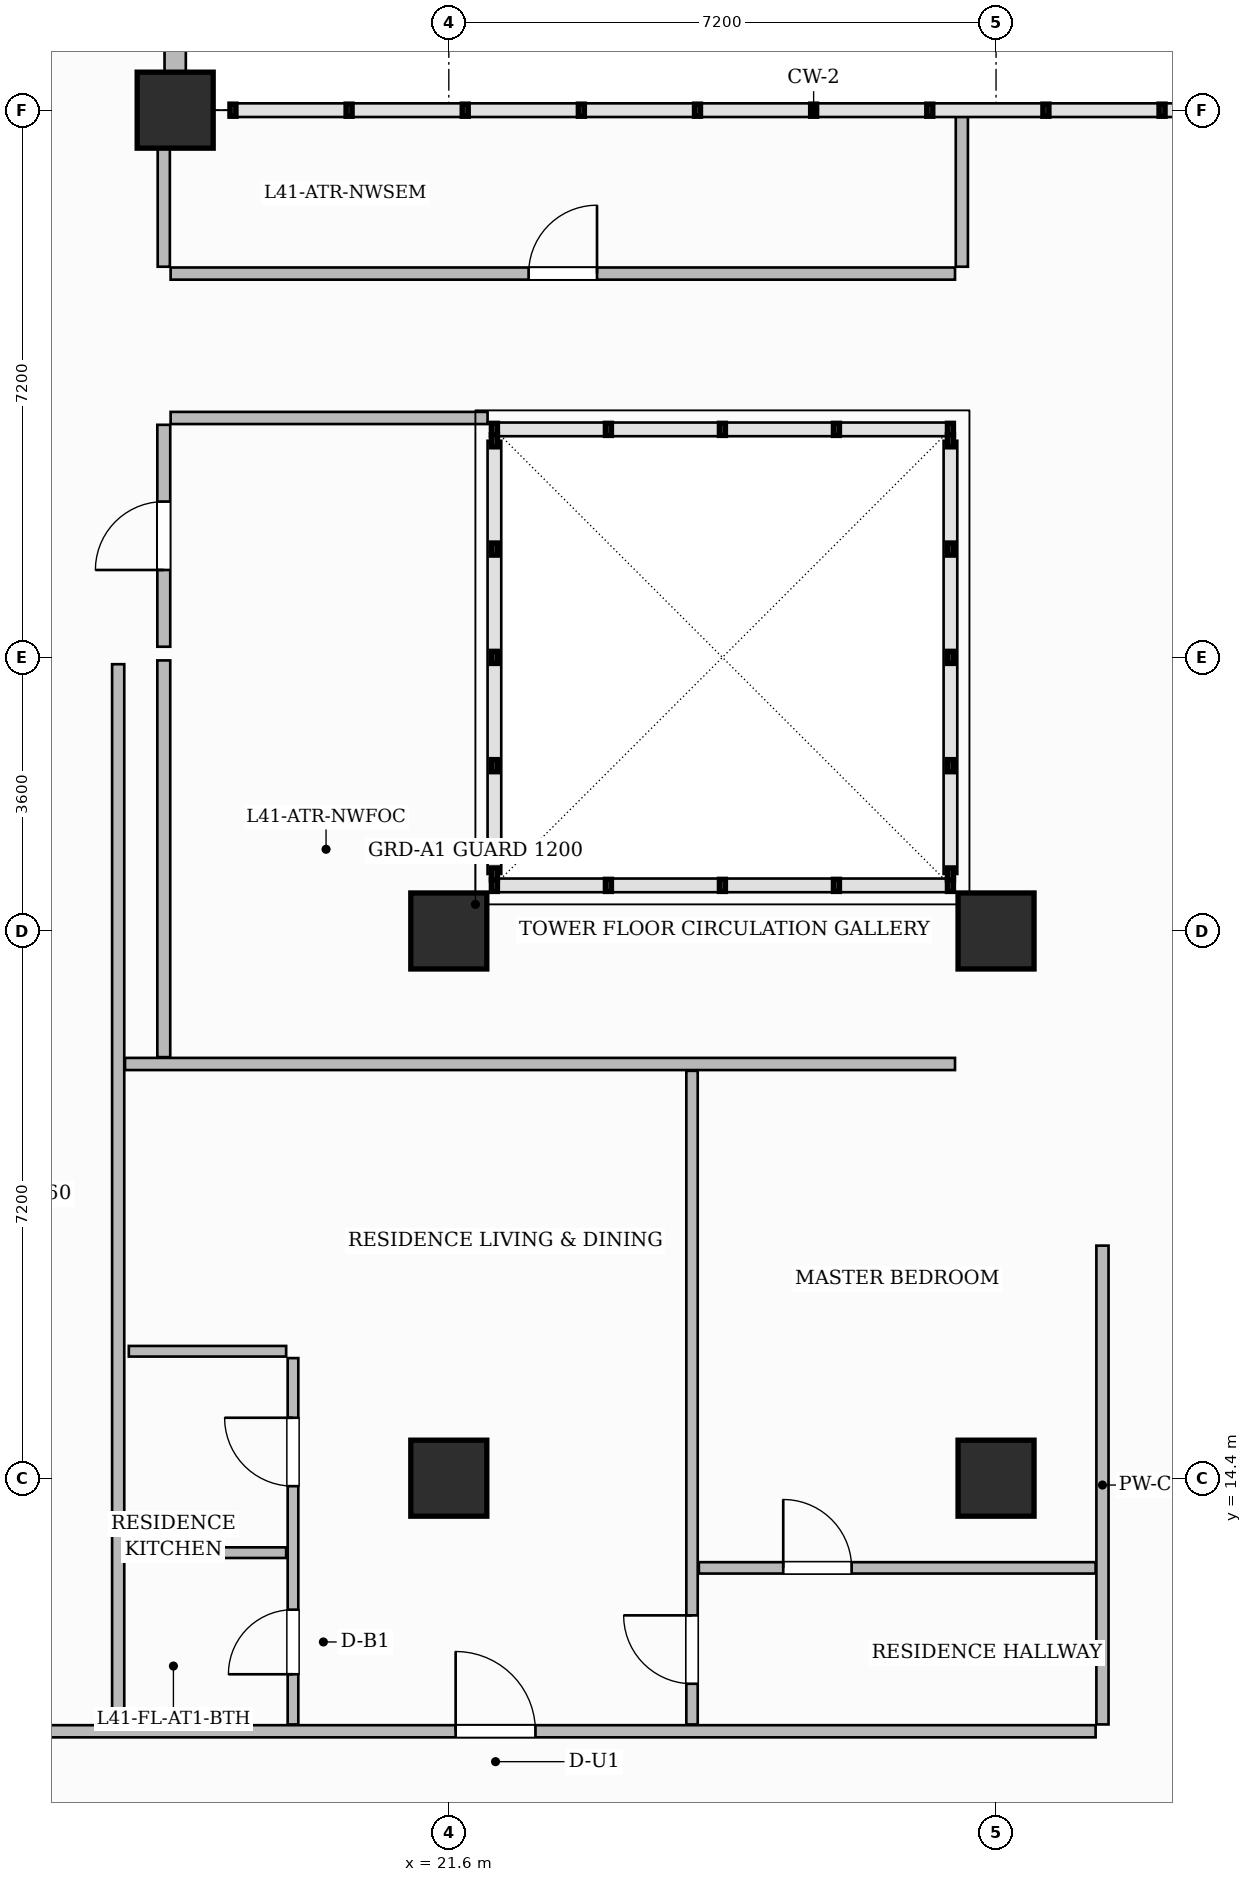
"""IFC4 building model, lengths in metres.
Left out: names, types, materials, properties, quantities, classifications, styles, units other than length and angle.
Written with IfcOpenShell. Run it as: python <this file> out.ifc"""

import sys

from ifc_helpers import new_model, si_unit, direction, frame, frame_2d, origin, origin_2d, place, context, subcontext, project, spatial, rectangle, extrude, source, transform, mapped, element, fill, save


model = new_model("IFC4")
c1 = context("Model", 3, precision=1e-05, world=origin(), true_north=direction((0.0, 1.0)))
c2 = subcontext(c1, "Body", "Model", "MODEL_VIEW")
j1 = project(units=[si_unit("LENGTHUNIT", "METRE"), si_unit("PLANEANGLEUNIT", "RADIAN")], contexts=[c1])
p1 = place(None, origin())
s1 = spatial("IfcSite", under=j1, at=p1, CompositionType="ELEMENT")
p2 = place(p1, origin())
s2 = spatial("IfcBuilding", under=s1, at=p2, CompositionType="ELEMENT")
p3 = place(p2, frame((0.0, 0.0, 165.7)))
s3 = spatial("IfcBuildingStorey", under=s2, at=p3, CompositionType="ELEMENT", Elevation=165.7)
m1 = source(origin(), c2, "Body", "SweptSolid", [
    extrude(rectangle(XDim=1.0, YDim=1.0, at=origin_2d()), origin(), (0.0, 0.0, 1.0), 3.85),
])
for number, where, z_axis, x_axis in (
    (1, (21.6, 14.4, 0.0), (0.0, 0.0, 1.0), (1.0, 0.0, 0.0)),
    (2, (21.6, 21.6, 0.0), (0.0, 0.0, 1.0), (1.0, 0.0, 0.0)),
    (3, (28.8, 14.4, 0.0), (0.0, 0.0, 1.0), (1.0, 0.0, 0.0)),
    (4, (28.8, 21.6, 0.0), (0.0, 0.0, 1.0), (1.0, 0.0, 0.0)),
    (5, (18.0, 32.4, 0.0), (0.0, 0.0, 1.0), (1.0, 0.0, 0.0)),
):
    element("IfcColumn", number, at=place(p3, frame(where, z_axis=z_axis, x_axis=x_axis)), inside=s3, PredefinedType="COLUMN", context=c2, shape_type="MappedRepresentation", body=[
        mapped(m1, transform((0.0, 0.0, 0.0), scale=1.0)),
    ])
p4 = place(p3, frame((14.548, 11.07, 0.0), z_axis=(0.0, 0.0, 1.0), x_axis=(1.0, 0.0, 0.0)))
e6 = element("IfcWall", 6, at=p4, inside=s3, PredefinedType="PARTITIONING", context=c2, shape_type="SweptSolid", body=[
    extrude(rectangle(XDim=15.562, YDim=0.16, at=frame_2d((7.781, 0.0))), origin(), (0.0, 0.0, 1.0), 3.6),
])
p5 = place(p4, frame((7.142, 0.0, 0.0)))
e7 = element("IfcOpeningElement", 7, at=p5, cuts=e6, PredefinedType="OPENING", context=c2, shape_type="SweptSolid", body=[
    extrude(rectangle(XDim=1.05, YDim=2.25, at=frame_2d((0.525, 1.125))), frame((0.0, 0.09, 0.0), z_axis=(0.0, -1.0, 0.0), x_axis=(1.0, 0.0, 0.0)), (0.0, 0.0, 1.0), 0.18),
])
p6 = place(p3, frame((30.2, 11.16, 0.0), z_axis=(0.0, 0.0, 1.0), x_axis=(0.0, 1.0, 0.0)))
e8 = element("IfcWall", 8, at=p6, inside=s3, PredefinedType="PARTITIONING", context=c2, shape_type="SweptSolid", body=[
    extrude(rectangle(XDim=6.3, YDim=0.16, at=frame_2d((3.15, 0.0))), origin(), (0.0, 0.0, 1.0), 3.6),
])
p7 = place(p3, frame((17.25, 11.16, 0.0), z_axis=(0.0, 0.0, 1.0), x_axis=(0.0, 1.0, 0.0)))
e9 = element("IfcWall", 9, at=p7, inside=s3, PredefinedType="PARTITIONING", context=c2, shape_type="SweptSolid", body=[
    extrude(rectangle(XDim=13.95, YDim=0.16, at=frame_2d((6.975, 0.0))), origin(), (0.0, 0.0, 1.0), 3.6),
])
p8 = place(p3, frame((17.85, 19.94, 0.0), z_axis=(0.0, 0.0, 1.0), x_axis=(0.0, 1.0, 0.0)))
e10 = element("IfcWall", 10, at=p8, inside=s3, PredefinedType="PARTITIONING", context=c2, shape_type="SweptSolid", body=[
    extrude(rectangle(XDim=5.22, YDim=0.17, at=frame_2d((2.61, 0.0))), origin(), (0.0, 0.0, 1.0), 3.285),
])
p9 = place(p3, frame((17.85, 30.34, 0.0), z_axis=(0.0, 0.0, 1.0), x_axis=(0.0, 1.0, 0.0)))
e11 = element("IfcWall", 11, at=p9, inside=s3, PredefinedType="PARTITIONING", context=c2, shape_type="SweptSolid", body=[
    extrude(rectangle(XDim=1.87, YDim=0.16, at=frame_2d((0.935, 0.0))), origin(), (0.0, 0.0, 1.0), 3.6),
])
p10 = place(p3, frame((28.35, 30.34, 0.0), z_axis=(0.0, 0.0, 1.0), x_axis=(0.0, 1.0, 0.0)))
e12 = element("IfcWall", 12, at=p10, inside=s3, PredefinedType="PARTITIONING", context=c2, shape_type="SweptSolid", body=[
    extrude(rectangle(XDim=2.032, YDim=0.16, at=frame_2d((1.016, 0.0))), origin(), (0.0, 0.0, 1.0), 3.6),
])
p11 = place(p3, frame((17.94, 28.35, 0.0), z_axis=(0.0, 0.0, 1.0), x_axis=(1.0, 0.0, 0.0)))
e13 = element("IfcWall", 13, at=p11, inside=s3, PredefinedType="PARTITIONING", context=c2, shape_type="SweptSolid", body=[
    extrude(rectangle(XDim=4.17, YDim=0.16, at=frame_2d((2.085, 0.0))), origin(), (0.0, 0.0, 1.0), 3.6),
])
p12 = place(p3, frame((17.94, 30.25, 0.0), z_axis=(0.0, 0.0, 1.0), x_axis=(1.0, 0.0, 0.0)))
e14 = element("IfcWall", 14, at=p12, inside=s3, PredefinedType="PARTITIONING", context=c2, shape_type="SweptSolid", body=[
    extrude(rectangle(XDim=10.32, YDim=0.16, at=frame_2d((5.16, 0.0))), origin(), (0.0, 0.0, 1.0), 3.6),
])
p13 = place(p12, frame((4.71, 0.0, 0.0)))
e15 = element("IfcOpeningElement", 15, at=p13, cuts=e14, PredefinedType="OPENING", context=c2, shape_type="SweptSolid", body=[
    extrude(rectangle(XDim=0.9, YDim=2.15, at=frame_2d((0.45, 1.075))), frame((0.0, 0.09, 0.0), z_axis=(0.0, -1.0, 0.0), x_axis=(1.0, 0.0, 0.0)), (0.0, 0.0, 1.0), 0.18),
])
p14 = place(p3, frame((17.85, 25.34, 0.0), z_axis=(0.0, 0.0, 1.0), x_axis=(0.0, 1.0, 0.0)))
e16 = element("IfcWall", 16, at=p14, inside=s3, PredefinedType="PARTITIONING", context=c2, shape_type="SweptSolid", body=[
    extrude(rectangle(XDim=2.92, YDim=0.17, at=frame_2d((1.46, 0.0))), origin(), (0.0, 0.0, 1.0), 3.6),
])
p15 = place(p14, frame((1.01, 0.0, 0.0)))
e17 = element("IfcOpeningElement", 17, at=p15, cuts=e16, PredefinedType="OPENING", context=c2, shape_type="SweptSolid", body=[
    extrude(rectangle(XDim=0.9, YDim=2.15, at=frame_2d((0.45, 1.075))), frame((0.0, 0.095, 0.0), z_axis=(0.0, -1.0, 0.0), x_axis=(1.0, 0.0, 0.0)), (0.0, 0.0, 1.0), 0.19),
])
p16 = place(p3, frame((17.34, 19.85, 0.0), z_axis=(0.0, 0.0, 1.0), x_axis=(1.0, 0.0, 0.0)))
e18 = element("IfcWall", 18, at=p16, inside=s3, PredefinedType="PARTITIONING", context=c2, shape_type="SweptSolid", body=[
    extrude(rectangle(XDim=10.92, YDim=0.16, at=frame_2d((5.46, 0.0))), origin(), (0.0, 0.0, 1.0), 3.6),
])
p17 = place(p3, frame((19.55, 11.16, 0.0), z_axis=(0.0, 0.0, 1.0), x_axis=(0.0, 1.0, 0.0)))
e19 = element("IfcWall", 19, at=p17, inside=s3, PredefinedType="PARTITIONING", context=c2, shape_type="SweptSolid", body=[
    extrude(rectangle(XDim=4.82, YDim=0.14, at=frame_2d((2.41, 0.0))), origin(), (0.0, 0.0, 1.0), 3.6),
])
p18 = place(p17, frame((0.66, 0.0, 0.0)))
e20 = element("IfcOpeningElement", 20, at=p18, cuts=e19, PredefinedType="OPENING", context=c2, shape_type="SweptSolid", body=[
    extrude(rectangle(XDim=0.85, YDim=2.1, at=frame_2d((0.425, 1.05))), frame((0.0, 0.08, 0.0), z_axis=(0.0, -1.0, 0.0), x_axis=(1.0, 0.0, 0.0)), (0.0, 0.0, 1.0), 0.16),
])
p19 = place(p17, frame((3.135, 0.0, 0.0)))
e21 = element("IfcOpeningElement", 21, at=p19, cuts=e19, PredefinedType="OPENING", context=c2, shape_type="SweptSolid", body=[
    extrude(rectangle(XDim=0.9, YDim=2.15, at=frame_2d((0.45, 1.075))), frame((0.0, 0.08, 0.0), z_axis=(0.0, -1.0, 0.0), x_axis=(1.0, 0.0, 0.0)), (0.0, 0.0, 1.0), 0.16),
])
for number, where, z_axis, x_axis in (
    (22, (17.39, 13.42, 0.0), (0.0, 0.0, 1.0), (1.0, 0.0, 0.0)),
    (23, (17.39, 16.07, 0.0), (0.0, 0.0, 1.0), (1.0, 0.0, 0.0)),
):
    element("IfcWall", number, at=place(p3, frame(where, z_axis=z_axis, x_axis=x_axis)), inside=s3, PredefinedType="PARTITIONING", context=c2, shape_type="SweptSolid", body=[
        extrude(rectangle(XDim=2.07, YDim=0.14, at=frame_2d((1.035, 0.0))), origin(), (0.0, 0.0, 1.0), 3.6),
    ])
p20 = place(p3, frame((24.8, 11.16, 0.0), z_axis=(0.0, 0.0, 1.0), x_axis=(0.0, 1.0, 0.0)))
e24 = element("IfcWall", 24, at=p20, inside=s3, PredefinedType="PARTITIONING", context=c2, shape_type="SweptSolid", body=[
    extrude(rectangle(XDim=8.6, YDim=0.15, at=frame_2d((4.3, 0.0))), origin(), (0.0, 0.0, 1.0), 3.6),
])
p21 = place(p20, frame((0.535, 0.0, 0.0)))
e25 = element("IfcOpeningElement", 25, at=p21, cuts=e24, PredefinedType="OPENING", context=c2, shape_type="SweptSolid", body=[
    extrude(rectangle(XDim=0.9, YDim=2.15, at=frame_2d((0.45, 1.075))), frame((0.0, 0.085, 0.0), z_axis=(0.0, -1.0, 0.0), x_axis=(1.0, 0.0, 0.0)), (0.0, 0.0, 1.0), 0.17),
])
p22 = place(p3, frame((24.89, 13.22, 0.0), z_axis=(0.0, 0.0, 1.0), x_axis=(1.0, 0.0, 0.0)))
e26 = element("IfcWall", 26, at=p22, inside=s3, PredefinedType="PARTITIONING", context=c2, shape_type="SweptSolid", body=[
    extrude(rectangle(XDim=5.22, YDim=0.15, at=frame_2d((2.61, 0.0))), origin(), (0.0, 0.0, 1.0), 3.6),
])
p23 = place(p22, frame((1.11, 0.0, 0.0)))
e27 = element("IfcOpeningElement", 27, at=p23, cuts=e26, PredefinedType="OPENING", context=c2, shape_type="SweptSolid", body=[
    extrude(rectangle(XDim=0.9, YDim=2.15, at=frame_2d((0.45, 1.075))), frame((0.0, 0.085, 0.0), z_axis=(0.0, -1.0, 0.0), x_axis=(1.0, 0.0, 0.0)), (0.0, 0.0, 1.0), 0.17),
])
p24 = place(p3, frame((18.0, 32.4, 0.0), z_axis=(0.0, 0.0, 1.0), x_axis=(0.0, 1.0, 0.0)))
e28 = element("IfcWall", 28, at=p24, inside=s3, PredefinedType="SOLIDWALL", context=c2, shape_type="SweptSolid", body=[
    extrude(rectangle(XDim=14.35, YDim=0.28, at=frame_2d((7.175, 0.0))), origin(), (0.0, 0.0, 1.0), 3.6),
])
p25 = place(p24, frame((1.5, 0.0, 0.0)))
e29 = element("IfcOpeningElement", 29, at=p25, cuts=e28, PredefinedType="OPENING", context=c2, shape_type="SweptSolid", body=[
    extrude(rectangle(XDim=1.2, YDim=2.2, at=frame_2d((0.6, 1.1))), frame((0.0, 0.15, 0.0), z_axis=(0.0, -1.0, 0.0), x_axis=(1.0, 0.0, 0.0)), (0.0, 0.0, 1.0), 0.3),
])
p26 = place(p24, frame((3.8, 0.0, 0.8)))
e30 = element("IfcOpeningElement", 30, at=p26, cuts=e28, PredefinedType="OPENING", context=c2, shape_type="SweptSolid", body=[
    extrude(rectangle(XDim=1.8, YDim=1.85, at=frame_2d((0.9, 0.925))), frame((0.0, 0.15, 0.0), z_axis=(0.0, -1.0, 0.0), x_axis=(1.0, 0.0, 0.0)), (0.0, 0.0, 1.0), 0.3),
])
p27 = place(p24, frame((8.525, 0.0, 0.8)))
e31 = element("IfcOpeningElement", 31, at=p27, cuts=e28, PredefinedType="OPENING", context=c2, shape_type="SweptSolid", body=[
    extrude(rectangle(XDim=1.8, YDim=1.85, at=frame_2d((0.9, 0.925))), frame((0.0, 0.15, 0.0), z_axis=(0.0, -1.0, 0.0), x_axis=(1.0, 0.0, 0.0)), (0.0, 0.0, 1.0), 0.3),
])
p28 = place(p24, frame((11.275, 0.0, 0.8)))
e32 = element("IfcOpeningElement", 32, at=p28, cuts=e28, PredefinedType="OPENING", context=c2, shape_type="SweptSolid", body=[
    extrude(rectangle(XDim=1.8, YDim=1.85, at=frame_2d((0.9, 0.925))), frame((0.0, 0.15, 0.0), z_axis=(0.0, -1.0, 0.0), x_axis=(1.0, 0.0, 0.0)), (0.0, 0.0, 1.0), 0.3),
])
m2 = source(origin(), c2, "Body", "SweptSolid", [
    extrude(rectangle(XDim=0.9, YDim=2.15, at=frame_2d((0.45, 1.075))), frame((0.0, 0.025, 0.0), z_axis=(0.0, -1.0, 0.0), x_axis=(1.0, 0.0, 0.0)), (0.0, 0.0, 1.0), 0.05),
])
p29 = place(p15, origin())
e33 = element("IfcDoor", 33, at=p29, inside=s3, OperationType="SINGLE_SWING_LEFT", PredefinedType="DOOR", context=c2, shape_type="MappedRepresentation", body=[
    mapped(m2, transform((0.0, 0.0, 0.0), scale=1.0)),
])
fill(e17, e33)
p30 = place(p13, origin())
e34 = element("IfcDoor", 34, at=p30, inside=s3, OperationType="SINGLE_SWING_RIGHT", PredefinedType="DOOR", context=c2, shape_type="MappedRepresentation", body=[
    mapped(m2, transform((0.0, 0.0, 0.0), scale=1.0)),
])
fill(e15, e34)
m3 = source(origin(), c2, "Body", "SweptSolid", [
    extrude(rectangle(XDim=0.85, YDim=2.1, at=frame_2d((0.425, 1.05))), frame((0.0, 0.025, 0.0), z_axis=(0.0, -1.0, 0.0), x_axis=(1.0, 0.0, 0.0)), (0.0, 0.0, 1.0), 0.05),
])
p31 = place(p18, origin())
e35 = element("IfcDoor", 35, at=p31, inside=s3, OperationType="SINGLE_SWING_LEFT", PredefinedType="DOOR", context=c2, shape_type="MappedRepresentation", body=[
    mapped(m3, transform((0.0, 0.0, 0.0), scale=1.0)),
])
fill(e20, e35)
p32 = place(p19, origin())
e36 = element("IfcDoor", 36, at=p32, inside=s3, OperationType="SINGLE_SWING_RIGHT", PredefinedType="DOOR", context=c2, shape_type="MappedRepresentation", body=[
    mapped(m2, transform((0.0, 0.0, 0.0), scale=1.0)),
])
fill(e21, e36)
m4 = source(origin(), c2, "Body", "SweptSolid", [
    extrude(rectangle(XDim=1.05, YDim=2.25, at=frame_2d((0.525, 1.125))), frame((0.0, 0.025, 0.0), z_axis=(0.0, -1.0, 0.0), x_axis=(1.0, 0.0, 0.0)), (0.0, 0.0, 1.0), 0.05),
])
p33 = place(p5, origin())
e37 = element("IfcDoor", 37, at=p33, inside=s3, OperationType="SINGLE_SWING_LEFT", PredefinedType="DOOR", context=c2, shape_type="MappedRepresentation", body=[
    mapped(m4, transform((0.0, 0.0, 0.0), scale=1.0)),
])
fill(e7, e37)
p34 = place(p21, origin())
e38 = element("IfcDoor", 38, at=p34, inside=s3, OperationType="SINGLE_SWING_RIGHT", PredefinedType="DOOR", context=c2, shape_type="MappedRepresentation", body=[
    mapped(m2, transform((0.0, 0.0, 0.0), scale=1.0)),
])
fill(e25, e38)
p35 = place(p23, origin())
e39 = element("IfcDoor", 39, at=p35, inside=s3, OperationType="SINGLE_SWING_LEFT", PredefinedType="DOOR", context=c2, shape_type="MappedRepresentation", body=[
    mapped(m2, transform((0.0, 0.0, 0.0), scale=1.0)),
])
fill(e27, e39)
save(model, sys.argv[1])
